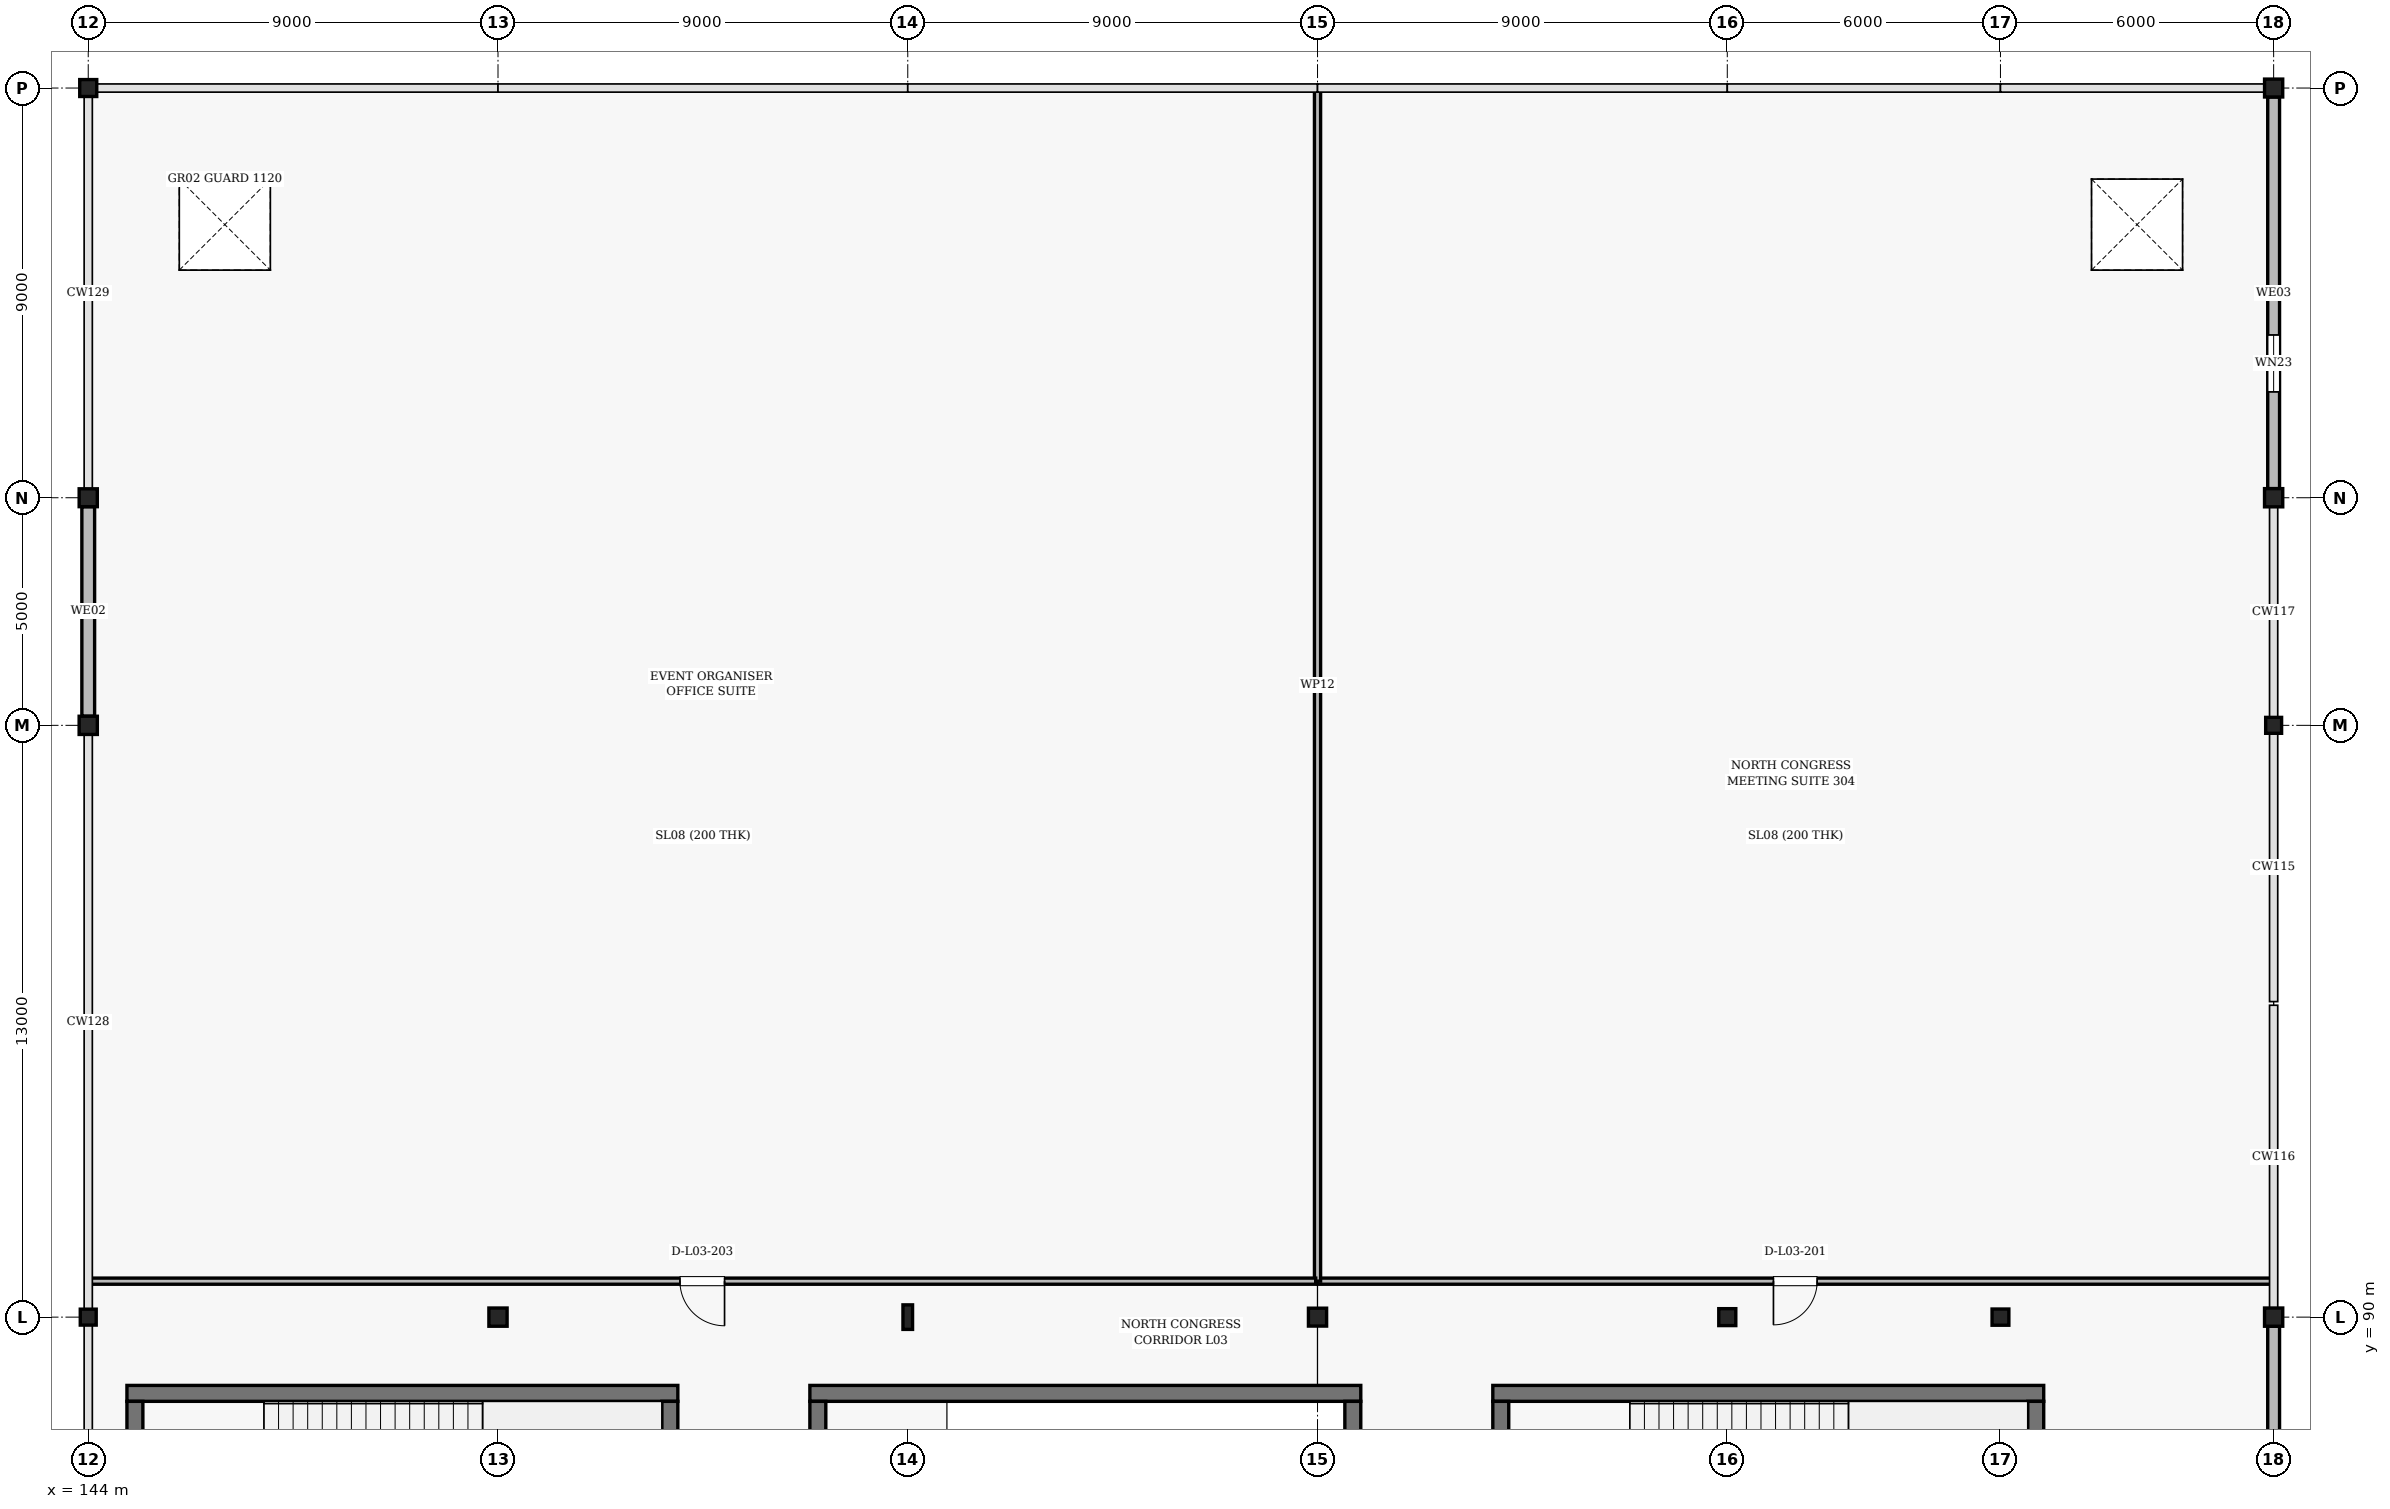
"""IFC4 building model, lengths in metres.
Left out: names, types, materials, properties, quantities, classifications, styles, units other than length and angle.
Written with IfcOpenShell. Run it as: python <this file> out.ifc"""

import sys

from ifc_helpers import new_model, si_unit, direction, frame, frame_2d, origin, origin_2d, place, context, subcontext, project, spatial, rectangle, hollow_rectangle, i_section, extrude, element, fill, save


model = new_model("IFC4")
c1 = context("Model", 3, precision=1e-05, world=origin(), true_north=direction((0.0, 1.0)))
c2 = subcontext(c1, "Body", "Model", "MODEL_VIEW")
j1 = project(units=[si_unit("LENGTHUNIT", "METRE"), si_unit("PLANEANGLEUNIT", "RADIAN")], contexts=[c1])
p1 = place(None, origin())
s1 = spatial("IfcSite", under=j1, at=p1, CompositionType="ELEMENT")
p2 = place(p1, origin())
s2 = spatial("IfcBuilding", under=s1, at=p2, CompositionType="ELEMENT")
p3 = place(p2, frame((0.0, 0.0, 15.6)))
s3 = spatial("IfcBuildingStorey", under=s2, at=p3, CompositionType="ELEMENT", Elevation=15.6)
p4 = place(p3, frame((144.0, 90.0, 0.0), z_axis=(0.0, 0.0, 1.0), x_axis=(1.0, 0.0, 0.0)))
e1 = element("IfcColumn", 1, at=p4, inside=s3, PredefinedType="COLUMN", context=c2, shape_type="SweptSolid", body=[
    extrude(hollow_rectangle(XDim=0.35, YDim=0.35, WallThickness=0.012, InnerFilletRadius=0.012, OuterFilletRadius=0.025, at=origin_2d()), origin(), (0.0, 0.0, 1.0), 4.635),
])
p5 = place(p3, frame((144.0, 103.0, 0.0), z_axis=(0.0, 0.0, 1.0), x_axis=(1.0, 0.0, 0.0)))
e2 = element("IfcColumn", 2, at=p5, inside=s3, PredefinedType="COLUMN", context=c2, shape_type="SweptSolid", body=[
    extrude(hollow_rectangle(XDim=0.4, YDim=0.4, WallThickness=0.016, InnerFilletRadius=0.016, OuterFilletRadius=0.032, at=origin_2d()), origin(), (0.0, 0.0, 1.0), 4.64),
])
p6 = place(p3, frame((144.0, 108.0, 0.0), z_axis=(0.0, 0.0, 1.0), x_axis=(1.0, 0.0, 0.0)))
e3 = element("IfcColumn", 3, at=p6, inside=s3, PredefinedType="COLUMN", context=c2, shape_type="SweptSolid", body=[
    extrude(i_section(OverallWidth=0.399, OverallDepth=0.393, WebThickness=0.023, FlangeThickness=0.037, FilletRadius=0.018, at=origin_2d()), origin(), (0.0, 0.0, 1.0), 4.64),
])
p7 = place(p3, frame((144.0, 117.0, 0.0), z_axis=(0.0, 0.0, 1.0), x_axis=(1.0, 0.0, 0.0)))
e4 = element("IfcColumn", 4, at=p7, inside=s3, PredefinedType="COLUMN", context=c2, shape_type="SweptSolid", body=[
    extrude(i_section(OverallWidth=0.374, OverallDepth=0.372, WebThickness=0.016, FlangeThickness=0.026, FilletRadius=0.016, at=origin_2d()), origin(), (0.0, 0.0, 1.0), 4.64),
])
p8 = place(p3, frame((153.0, 90.0, 0.0), z_axis=(0.0, 0.0, 1.0), x_axis=(1.0, 0.0, 0.0)))
e5 = element("IfcColumn", 5, at=p8, inside=s3, PredefinedType="COLUMN", context=c2, shape_type="SweptSolid", body=[
    extrude(hollow_rectangle(XDim=0.4, YDim=0.4, WallThickness=0.016, InnerFilletRadius=0.016, OuterFilletRadius=0.032, at=origin_2d()), origin(), (0.0, 0.0, 1.0), 4.8),
])
p9 = place(p3, frame((162.0, 90.0, 0.0), z_axis=(0.0, 0.0, 1.0), x_axis=(1.0, 0.0, 0.0)))
e6 = element("IfcColumn", 6, at=p9, inside=s3, PredefinedType="COLUMN", context=c2, shape_type="SweptSolid", body=[
    extrude(i_section(OverallWidth=0.211, OverallDepth=0.539, WebThickness=0.012, FlangeThickness=0.019, FilletRadius=0.014, at=origin_2d()), origin(), (0.0, 0.0, 1.0), 4.8),
])
p10 = place(p3, frame((171.0, 90.0, 0.0), z_axis=(0.0, 0.0, 1.0), x_axis=(1.0, 0.0, 0.0)))
e7 = element("IfcColumn", 7, at=p10, inside=s3, PredefinedType="COLUMN", context=c2, shape_type="SweptSolid", body=[
    extrude(i_section(OverallWidth=0.399, OverallDepth=0.393, WebThickness=0.023, FlangeThickness=0.037, FilletRadius=0.018, at=origin_2d()), origin(), (0.0, 0.0, 1.0), 4.8),
])
p11 = place(p3, frame((180.0, 90.0, 0.0), z_axis=(0.0, 0.0, 1.0), x_axis=(1.0, 0.0, 0.0)))
e8 = element("IfcColumn", 8, at=p11, inside=s3, PredefinedType="COLUMN", context=c2, shape_type="SweptSolid", body=[
    extrude(i_section(OverallWidth=0.374, OverallDepth=0.372, WebThickness=0.016, FlangeThickness=0.026, FilletRadius=0.016, at=origin_2d()), origin(), (0.0, 0.0, 1.0), 4.8),
])
p12 = place(p3, frame((186.0, 90.0, 0.0), z_axis=(0.0, 0.0, 1.0), x_axis=(1.0, 0.0, 0.0)))
e9 = element("IfcColumn", 9, at=p12, inside=s3, PredefinedType="COLUMN", context=c2, shape_type="SweptSolid", body=[
    extrude(i_section(OverallWidth=0.369, OverallDepth=0.356, WebThickness=0.011, FlangeThickness=0.018, FilletRadius=0.015, at=origin_2d()), origin(), (0.0, 0.0, 1.0), 4.8),
])
p13 = place(p3, frame((192.0, 90.0, 0.0), z_axis=(0.0, 0.0, 1.0), x_axis=(1.0, 0.0, 0.0)))
e10 = element("IfcColumn", 10, at=p13, inside=s3, PredefinedType="COLUMN", context=c2, shape_type="SweptSolid", body=[
    extrude(hollow_rectangle(XDim=0.4, YDim=0.4, WallThickness=0.016, InnerFilletRadius=0.016, OuterFilletRadius=0.032, at=origin_2d()), origin(), (0.0, 0.0, 1.0), 4.8),
])
p14 = place(p3, frame((192.0, 103.0, 0.0), z_axis=(0.0, 0.0, 1.0), x_axis=(1.0, 0.0, 0.0)))
e11 = element("IfcColumn", 11, at=p14, inside=s3, PredefinedType="COLUMN", context=c2, shape_type="SweptSolid", body=[
    extrude(hollow_rectangle(XDim=0.35, YDim=0.35, WallThickness=0.012, InnerFilletRadius=0.012, OuterFilletRadius=0.025, at=origin_2d()), origin(), (0.0, 0.0, 1.0), 4.8),
])
p15 = place(p3, frame((192.0, 108.0, 0.0), z_axis=(0.0, 0.0, 1.0), x_axis=(1.0, 0.0, 0.0)))
e12 = element("IfcColumn", 12, at=p15, inside=s3, PredefinedType="COLUMN", context=c2, shape_type="SweptSolid", body=[
    extrude(hollow_rectangle(XDim=0.4, YDim=0.4, WallThickness=0.016, InnerFilletRadius=0.016, OuterFilletRadius=0.032, at=origin_2d()), origin(), (0.0, 0.0, 1.0), 4.8),
])
p16 = place(p3, frame((192.0, 117.0, 0.0), z_axis=(0.0, 0.0, 1.0), x_axis=(1.0, 0.0, 0.0)))
e13 = element("IfcColumn", 13, at=p16, inside=s3, PredefinedType="COLUMN", context=c2, shape_type="SweptSolid", body=[
    extrude(i_section(OverallWidth=0.399, OverallDepth=0.393, WebThickness=0.023, FlangeThickness=0.037, FilletRadius=0.018, at=origin_2d()), origin(), (0.0, 0.0, 1.0), 4.64),
])
p17 = place(p3, frame((192.0, 89.8, 0.0), z_axis=(0.0, 0.0, 1.0), x_axis=(0.0, -1.0, 0.0)))
e14 = element("IfcWall", 14, at=p17, inside=s3, PredefinedType="SOLIDWALL", context=c2, shape_type="SweptSolid", body=[
    extrude(rectangle(XDim=8.25, YDim=0.26, at=frame_2d((4.125, 0.0))), origin(), (0.0, 0.0, 1.0), 4.046),
])
p18 = place(p3, frame((192.0, 116.803, 0.0), z_axis=(0.0, 0.0, 1.0), x_axis=(0.0, -1.0, 0.0)))
e15 = element("IfcWall", 15, at=p18, inside=s3, PredefinedType="SOLIDWALL", context=c2, shape_type="SweptSolid", body=[
    extrude(rectangle(XDim=8.604, YDim=0.26, at=frame_2d((4.302, 0.0))), origin(), (0.0, 0.0, 1.0), 4.086),
])
p19 = place(p18, frame((5.228, 0.0, 0.95)))
e16 = element("IfcOpeningElement", 16, at=p19, cuts=e15, PredefinedType="OPENING", context=c2, shape_type="SweptSolid", body=[
    extrude(rectangle(XDim=1.25, YDim=1.55, at=frame_2d((0.625, 0.775))), frame((0.0, 0.14, 0.0), z_axis=(0.0, -1.0, 0.0), x_axis=(1.0, 0.0, 0.0)), (0.0, 0.0, 1.0), 0.28),
])
p20 = place(p3, frame((144.0, 103.2, 0.0), z_axis=(0.0, 0.0, 1.0), x_axis=(0.0, 1.0, 0.0)))
e17 = element("IfcWall", 17, at=p20, inside=s3, PredefinedType="SOLIDWALL", context=c2, shape_type="SweptSolid", body=[
    extrude(rectangle(XDim=4.604, YDim=0.28, at=frame_2d((2.302, 0.0))), origin(), (0.0, 0.0, 1.0), 3.852),
])
p21 = place(p3, frame((156.95, 88.325, 0.0), z_axis=(0.0, 0.0, 1.0), x_axis=(-1.0, 0.0, 0.0)))
e18 = element("IfcWall", 18, at=p21, inside=s3, PredefinedType="SHEAR", context=c2, shape_type="SweptSolid", body=[
    extrude(rectangle(XDim=12.1, YDim=0.35, at=frame_2d((6.05, 0.0))), origin(), (0.0, 0.0, 1.0), 4.635),
])
p22 = place(p3, frame((145.025, 88.15, 0.0), z_axis=(0.0, 0.0, 1.0), x_axis=(0.0, -1.0, 0.0)))
e19 = element("IfcWall", 19, at=p22, inside=s3, PredefinedType="SHEAR", context=c2, shape_type="SweptSolid", body=[
    extrude(rectangle(XDim=5.5, YDim=0.35, at=frame_2d((2.75, 0.0))), origin(), (0.0, 0.0, 1.0), 4.635),
])
p23 = place(p22, frame((1.85, 0.0, 0.0)))
e20 = element("IfcOpeningElement", 20, at=p23, cuts=e19, PredefinedType="OPENING", context=c2, shape_type="SweptSolid", body=[
    extrude(rectangle(XDim=1.8, YDim=2.2, at=frame_2d((0.9, 1.1))), frame((0.0, 0.185, 0.0), z_axis=(0.0, -1.0, 0.0), x_axis=(1.0, 0.0, 0.0)), (0.0, 0.0, 1.0), 0.37),
])
p24 = place(p3, frame((156.775, 82.65, 0.0), z_axis=(0.0, 0.0, 1.0), x_axis=(0.0, 1.0, 0.0)))
e21 = element("IfcWall", 21, at=p24, inside=s3, PredefinedType="SHEAR", context=c2, shape_type="SweptSolid", body=[
    extrude(rectangle(XDim=5.5, YDim=0.35, at=frame_2d((2.75, 0.0))), origin(), (0.0, 0.0, 1.0), 4.635),
])
p25 = place(p3, frame((171.95, 88.325, 0.0), z_axis=(0.0, 0.0, 1.0), x_axis=(-1.0, 0.0, 0.0)))
e22 = element("IfcWall", 22, at=p25, inside=s3, PredefinedType="SHEAR", context=c2, shape_type="SweptSolid", body=[
    extrude(rectangle(XDim=12.1, YDim=0.35, at=frame_2d((6.05, 0.0))), origin(), (0.0, 0.0, 1.0), 4.6),
])
p26 = place(p3, frame((160.025, 88.15, 0.0), z_axis=(0.0, 0.0, 1.0), x_axis=(0.0, -1.0, 0.0)))
e23 = element("IfcWall", 23, at=p26, inside=s3, PredefinedType="SHEAR", context=c2, shape_type="SweptSolid", body=[
    extrude(rectangle(XDim=5.5, YDim=0.35, at=frame_2d((2.75, 0.0))), origin(), (0.0, 0.0, 1.0), 4.635),
])
p27 = place(p26, frame((1.85, 0.0, 0.0)))
e24 = element("IfcOpeningElement", 24, at=p27, cuts=e23, PredefinedType="OPENING", context=c2, shape_type="SweptSolid", body=[
    extrude(rectangle(XDim=1.8, YDim=2.2, at=frame_2d((0.9, 1.1))), frame((0.0, 0.185, 0.0), z_axis=(0.0, -1.0, 0.0), x_axis=(1.0, 0.0, 0.0)), (0.0, 0.0, 1.0), 0.37),
])
p28 = place(p3, frame((171.775, 82.65, 0.0), z_axis=(0.0, 0.0, 1.0), x_axis=(0.0, 1.0, 0.0)))
e25 = element("IfcWall", 25, at=p28, inside=s3, PredefinedType="SHEAR", context=c2, shape_type="SweptSolid", body=[
    extrude(rectangle(XDim=5.5, YDim=0.35, at=frame_2d((2.75, 0.0))), origin(), (0.0, 0.0, 1.0), 4.6),
])
p29 = place(p3, frame((186.95, 88.325, 0.0), z_axis=(0.0, 0.0, 1.0), x_axis=(-1.0, 0.0, 0.0)))
e26 = element("IfcWall", 26, at=p29, inside=s3, PredefinedType="SHEAR", context=c2, shape_type="SweptSolid", body=[
    extrude(rectangle(XDim=12.1, YDim=0.35, at=frame_2d((6.05, 0.0))), origin(), (0.0, 0.0, 1.0), 4.6),
])
p30 = place(p3, frame((175.025, 88.15, 0.0), z_axis=(0.0, 0.0, 1.0), x_axis=(0.0, -1.0, 0.0)))
e27 = element("IfcWall", 27, at=p30, inside=s3, PredefinedType="SHEAR", context=c2, shape_type="SweptSolid", body=[
    extrude(rectangle(XDim=5.5, YDim=0.35, at=frame_2d((2.75, 0.0))), origin(), (0.0, 0.0, 1.0), 4.6),
])
p31 = place(p30, frame((1.85, 0.0, 0.0)))
e28 = element("IfcOpeningElement", 28, at=p31, cuts=e27, PredefinedType="OPENING", context=c2, shape_type="SweptSolid", body=[
    extrude(rectangle(XDim=1.8, YDim=2.2, at=frame_2d((0.9, 1.1))), frame((0.0, 0.185, 0.0), z_axis=(0.0, -1.0, 0.0), x_axis=(1.0, 0.0, 0.0)), (0.0, 0.0, 1.0), 0.37),
])
p32 = place(p3, frame((186.775, 82.65, 0.0), z_axis=(0.0, 0.0, 1.0), x_axis=(0.0, 1.0, 0.0)))
e29 = element("IfcWall", 29, at=p32, inside=s3, PredefinedType="SHEAR", context=c2, shape_type="SweptSolid", body=[
    extrude(rectangle(XDim=5.5, YDim=0.35, at=frame_2d((2.75, 0.0))), origin(), (0.0, 0.0, 1.0), 4.6),
])
p33 = place(p3, frame((191.988, 90.79, 0.0), z_axis=(0.0, 0.0, 1.0), x_axis=(-1.0, 0.0, 0.0)))
e30 = element("IfcWall", 30, at=p33, inside=s3, PredefinedType="PARTITIONING", context=c2, shape_type="SweptSolid", body=[
    extrude(rectangle(XDim=20.988, YDim=0.135, at=frame_2d((10.494, 0.0))), origin(), (0.0, 0.0, 1.0), 3.73),
])
p34 = place(p33, frame((10.014, 0.0, 0.0)))
e31 = element("IfcOpeningElement", 31, at=p34, cuts=e30, PredefinedType="OPENING", context=c2, shape_type="SweptSolid", body=[
    extrude(rectangle(XDim=0.96, YDim=2.15, at=frame_2d((0.48, 1.075))), frame((0.0, 0.078, 0.0), z_axis=(0.0, -1.0, 0.0), x_axis=(1.0, 0.0, 0.0)), (0.0, 0.0, 1.0), 0.155),
])
p35 = place(p3, frame((171.0, 90.79, 0.0), z_axis=(0.0, 0.0, 1.0), x_axis=(0.0, 1.0, 0.0)))
e32 = element("IfcWall", 32, at=p35, inside=s3, PredefinedType="PARTITIONING", context=c2, shape_type="SweptSolid", body=[
    extrude(rectangle(XDim=26.198, YDim=0.135, at=frame_2d((13.099, 0.0))), origin(), (0.0, 0.0, 1.0), 3.563),
])
p36 = place(p3, frame((170.96, 90.79, 0.0), z_axis=(0.0, 0.0, 1.0), x_axis=(-1.0, 0.0, 0.0)))
e33 = element("IfcWall", 33, at=p36, inside=s3, PredefinedType="PARTITIONING", context=c2, shape_type="SweptSolid", body=[
    extrude(rectangle(XDim=26.948, YDim=0.135, at=frame_2d((13.474, 0.0))), origin(), (0.0, 0.0, 1.0), 3.73),
])
p37 = place(p36, frame((12.984, 0.0, 0.0)))
e34 = element("IfcOpeningElement", 34, at=p37, cuts=e33, PredefinedType="OPENING", context=c2, shape_type="SweptSolid", body=[
    extrude(rectangle(XDim=0.98, YDim=2.15, at=frame_2d((0.49, 1.075))), frame((0.0, 0.078, 0.0), z_axis=(0.0, -1.0, 0.0), x_axis=(1.0, 0.0, 0.0)), (0.0, 0.0, 1.0), 0.155),
])
p38 = place(p19, origin())
e35 = element("IfcWindow", 35, at=p38, inside=s3, PartitioningType="SINGLE_PANEL", PredefinedType="WINDOW", context=c2, shape_type="SweptSolid", body=[
    extrude(rectangle(XDim=1.25, YDim=1.55, at=frame_2d((0.625, 0.775))), frame((0.0, 0.03, 0.0), z_axis=(0.0, -1.0, 0.0), x_axis=(1.0, 0.0, 0.0)), (0.0, 0.0, 1.0), 0.06),
])
fill(e16, e35)
p39 = place(p34, origin())
e36 = element("IfcDoor", 36, at=p39, inside=s3, OperationType="SINGLE_SWING_RIGHT", PredefinedType="DOOR", context=c2, shape_type="SweptSolid", body=[
    extrude(rectangle(XDim=0.96, YDim=2.15, at=frame_2d((0.48, 1.075))), frame((0.0, 0.025, 0.0), z_axis=(0.0, -1.0, 0.0), x_axis=(1.0, 0.0, 0.0)), (0.0, 0.0, 1.0), 0.05),
])
fill(e31, e36)
p40 = place(p37, origin())
e37 = element("IfcDoor", 37, at=p40, inside=s3, OperationType="SINGLE_SWING_LEFT", PredefinedType="DOOR", context=c2, shape_type="SweptSolid", body=[
    extrude(rectangle(XDim=0.98, YDim=2.15, at=frame_2d((0.49, 1.075))), frame((0.0, 0.025, 0.0), z_axis=(0.0, -1.0, 0.0), x_axis=(1.0, 0.0, 0.0)), (0.0, 0.0, 1.0), 0.05),
])
fill(e34, e37)
save(model, sys.argv[1])
